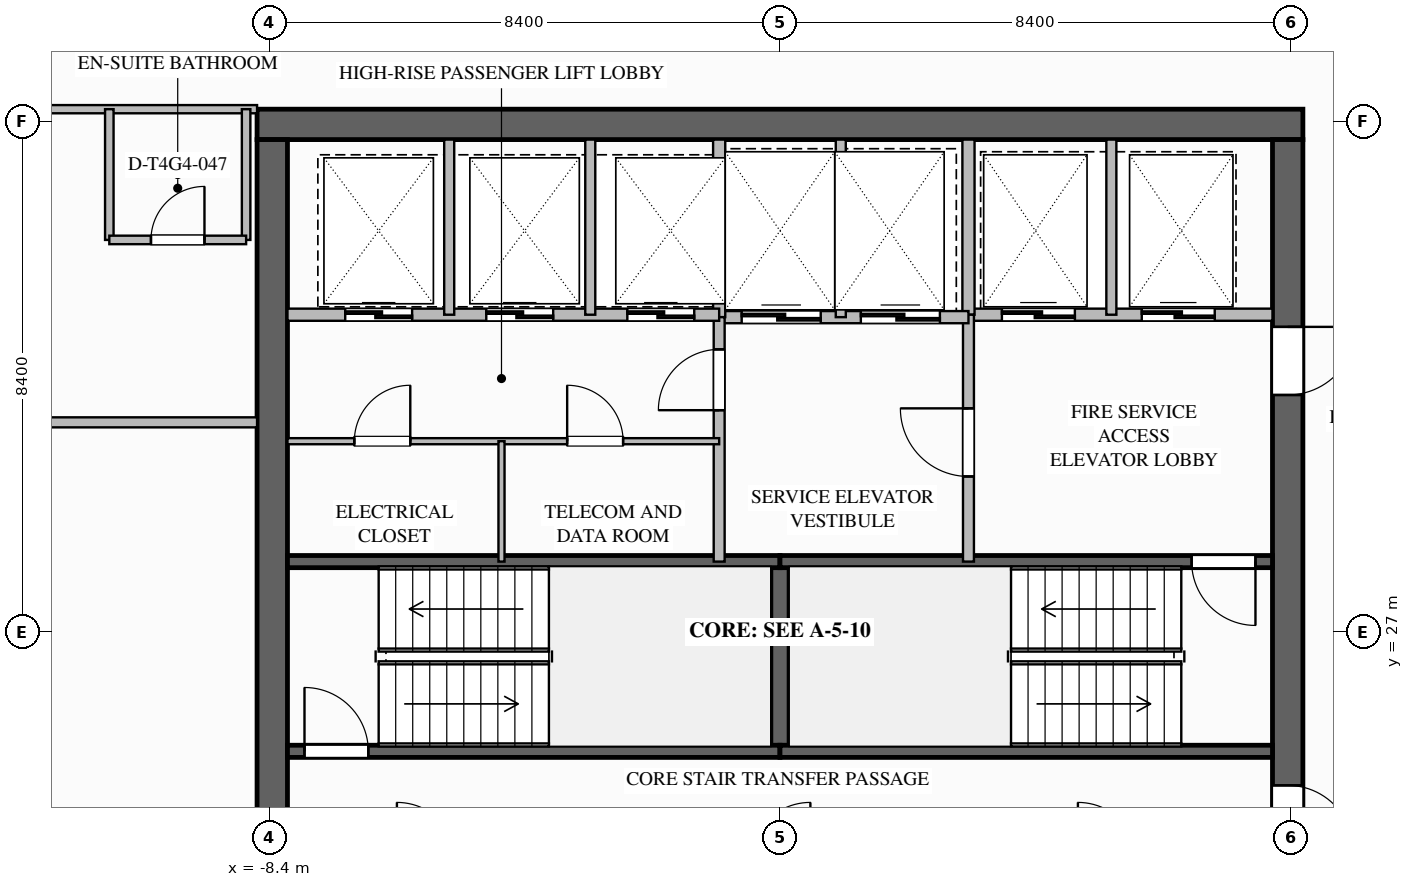
"""IFC4 building model, lengths in metres.
Left out: names, types, materials, properties, quantities, classifications, styles, units other than length and angle.
Written with IfcOpenShell. Run it as: python <this file> out.ifc"""

import sys

from ifc_helpers import new_model, si_unit, direction, frame, frame_2d, origin, place, context, subcontext, project, spatial, rectangle, extrude, element, fill, save


model = new_model("IFC4")
c1 = context("Model", 3, precision=1e-05, world=origin(), true_north=direction((0.0, 1.0)))
c2 = subcontext(c1, "Body", "Model", "MODEL_VIEW")
j1 = project(units=[si_unit("LENGTHUNIT", "METRE"), si_unit("PLANEANGLEUNIT", "RADIAN")], contexts=[c1])
p1 = place(None, origin())
s1 = spatial("IfcSite", under=j1, at=p1, CompositionType="ELEMENT")
p2 = place(p1, origin())
s2 = spatial("IfcBuilding", under=s1, at=p2, CompositionType="ELEMENT")
p3 = place(p2, frame((0.0, 0.0, 237.5)))
s3 = spatial("IfcBuildingStorey", under=s2, at=p3, CompositionType="ELEMENT", Elevation=237.5)
p4 = place(p3, frame((-8.6, 35.35, 0.0), z_axis=(0.0, 0.0, 1.0), x_axis=(1.0, 0.0, 0.0)))
e1 = element("IfcWall", 1, at=p4, inside=s3, PredefinedType="SHEAR", context=c2, shape_type="SweptSolid", body=[
    extrude(rectangle(XDim=17.2, YDim=0.5, at=frame_2d((8.6, 0.0))), origin(), (0.0, 0.0, 1.0), 3.6),
])
p5 = place(p3, frame((8.35, 35.1, 0.0), z_axis=(0.0, 0.0, 1.0), x_axis=(0.0, -1.0, 0.0)))
e2 = element("IfcWall", 2, at=p5, inside=s3, PredefinedType="SHEAR", context=c2, shape_type="SweptSolid", body=[
    extrude(rectangle(XDim=16.2, YDim=0.5, at=frame_2d((8.1, 0.0))), origin(), (0.0, 0.0, 1.0), 3.6),
])
p6 = place(p5, frame((3.08, 0.0, 0.0)))
e3 = element("IfcOpeningElement", 3, at=p6, cuts=e2, PredefinedType="OPENING", context=c2, shape_type="SweptSolid", body=[
    extrude(rectangle(XDim=1.12, YDim=2.1, at=frame_2d((0.56, 1.05))), frame((0.0, 0.26, 0.0), z_axis=(0.0, -1.0, 0.0), x_axis=(1.0, 0.0, 0.0)), (0.0, 0.0, 1.0), 0.52),
])
p7 = place(p5, frame((10.62, 0.0, 0.0)))
e4 = element("IfcOpeningElement", 4, at=p7, cuts=e2, PredefinedType="OPENING", context=c2, shape_type="SweptSolid", body=[
    extrude(rectangle(XDim=1.08, YDim=2.04, at=frame_2d((0.54, 1.02))), frame((0.0, 0.26, 0.0), z_axis=(0.0, -1.0, 0.0), x_axis=(1.0, 0.0, 0.0)), (0.0, 0.0, 1.0), 0.52),
])
p8 = place(p3, frame((-8.35, 18.9, 0.0), z_axis=(0.0, 0.0, 1.0), x_axis=(0.0, 1.0, 0.0)))
e5 = element("IfcWall", 5, at=p8, inside=s3, PredefinedType="SHEAR", context=c2, shape_type="SweptSolid", body=[
    extrude(rectangle(XDim=16.2, YDim=0.5, at=frame_2d((8.1, 0.0))), origin(), (0.0, 0.0, 1.0), 3.6),
])
p9 = place(p3, frame((0.0, 25.04, 0.0), z_axis=(0.0, 0.0, 1.0), x_axis=(0.0, 1.0, 0.0)))
e6 = element("IfcWall", 6, at=p9, inside=s3, PredefinedType="SOLIDWALL", context=c2, shape_type="SweptSolid", body=[
    extrude(rectangle(XDim=3.12, YDim=0.3, at=frame_2d((1.56, 0.0))), origin(), (0.0, 0.0, 1.0), 3.34),
])
p10 = place(p3, frame((-8.1, 25.04, 0.0), z_axis=(0.0, 0.0, 1.0), x_axis=(1.0, 0.0, 0.0)))
e7 = element("IfcWall", 7, at=p10, inside=s3, PredefinedType="SOLIDWALL", context=c2, shape_type="SweptSolid", body=[
    extrude(rectangle(XDim=8.1, YDim=0.2, at=frame_2d((4.05, 0.0))), origin(), (0.0, 0.0, 1.0), 3.34),
])
p11 = place(p10, frame((0.28, 0.0, 0.0)))
e8 = element("IfcOpeningElement", 8, at=p11, cuts=e7, PredefinedType="OPENING", context=c2, shape_type="SweptSolid", body=[
    extrude(rectangle(XDim=1.05, YDim=2.1, at=frame_2d((0.525, 1.05))), frame((0.0, 0.11, 0.0), z_axis=(0.0, -1.0, 0.0), x_axis=(1.0, 0.0, 0.0)), (0.0, 0.0, 1.0), 0.22),
])
for number, where, z_axis, x_axis in (
    (9, (-8.1, 28.16, 0.0), (0.0, 0.0, 1.0), (1.0, 0.0, 0.0)),
    (10, (0.0, 25.04, 0.0), (0.0, 0.0, 1.0), (1.0, 0.0, 0.0)),
):
    element("IfcWall", number, at=place(p3, frame(where, z_axis=z_axis, x_axis=x_axis)), inside=s3, PredefinedType="SOLIDWALL", context=c2, shape_type="SweptSolid", body=[
        extrude(rectangle(XDim=8.1, YDim=0.2, at=frame_2d((4.05, 0.0))), origin(), (0.0, 0.0, 1.0), 3.34),
    ])
p12 = place(p3, frame((8.1, 28.16, 0.0), z_axis=(0.0, 0.0, 1.0), x_axis=(-1.0, 0.0, 0.0)))
e11 = element("IfcWall", 11, at=p12, inside=s3, PredefinedType="SOLIDWALL", context=c2, shape_type="SweptSolid", body=[
    extrude(rectangle(XDim=8.1, YDim=0.2, at=frame_2d((4.05, 0.0))), origin(), (0.0, 0.0, 1.0), 3.34),
])
p13 = place(p12, frame((0.28, 0.0, 0.0)))
e12 = element("IfcOpeningElement", 12, at=p13, cuts=e11, PredefinedType="OPENING", context=c2, shape_type="SweptSolid", body=[
    extrude(rectangle(XDim=1.05, YDim=2.1, at=frame_2d((0.525, 1.05))), frame((0.0, 0.11, 0.0), z_axis=(0.0, -1.0, 0.0), x_axis=(1.0, 0.0, 0.0)), (0.0, 0.0, 1.0), 0.22),
])
p14 = place(p3, frame((3.1, 32.22, 0.0), z_axis=(0.0, 0.0, 1.0), x_axis=(1.0, 0.0, 0.0)))
e13 = element("IfcWall", 13, at=p14, inside=s3, PredefinedType="SOLIDWALL", context=c2, shape_type="SweptSolid", body=[
    extrude(rectangle(XDim=5.0, YDim=0.2, at=frame_2d((2.5, 0.0))), origin(), (0.0, 0.0, 1.0), 3.34),
])
p15 = place(p14, frame((0.55, 0.0, 0.0)))
e14 = element("IfcOpeningElement", 14, at=p15, cuts=e13, PredefinedType="OPENING", context=c2, shape_type="SweptSolid", body=[
    extrude(rectangle(XDim=1.2, YDim=2.2, at=frame_2d((0.6, 1.1))), frame((0.0, 0.11, 0.0), z_axis=(0.0, -1.0, 0.0), x_axis=(1.0, 0.0, 0.0)), (0.0, 0.0, 1.0), 0.22),
])
p16 = place(p14, frame((2.85, 0.0, 0.0)))
e15 = element("IfcOpeningElement", 15, at=p16, cuts=e13, PredefinedType="OPENING", context=c2, shape_type="SweptSolid", body=[
    extrude(rectangle(XDim=1.2, YDim=2.2, at=frame_2d((0.6, 1.1))), frame((0.0, 0.11, 0.0), z_axis=(0.0, -1.0, 0.0), x_axis=(1.0, 0.0, 0.0)), (0.0, 0.0, 1.0), 0.22),
])
p17 = place(p3, frame((3.1, 32.22, 0.0), z_axis=(0.0, 0.0, 1.0), x_axis=(0.0, 1.0, 0.0)))
e16 = element("IfcWall", 16, at=p17, inside=s3, PredefinedType="SOLIDWALL", context=c2, shape_type="SweptSolid", body=[
    extrude(rectangle(XDim=2.88, YDim=0.2, at=frame_2d((1.44, 0.0))), origin(), (0.0, 0.0, 1.0), 3.34),
])
p18 = place(p3, frame((5.45, 32.22, 0.0), z_axis=(0.0, 0.0, 1.0), x_axis=(0.0, 1.0, 0.0)))
e17 = element("IfcWall", 17, at=p18, inside=s3, PredefinedType="PARTITIONING", context=c2, shape_type="SweptSolid", body=[
    extrude(rectangle(XDim=2.88, YDim=0.165, at=frame_2d((1.44, 0.0))), origin(), (0.0, 0.0, 1.0), 3.34),
])
p19 = place(p3, frame((3.1, 28.16, 0.0), z_axis=(0.0, 0.0, 1.0), x_axis=(0.0, 1.0, 0.0)))
e18 = element("IfcWall", 18, at=p19, inside=s3, PredefinedType="SOLIDWALL", context=c2, shape_type="SweptSolid", body=[
    extrude(rectangle(XDim=4.06, YDim=0.18, at=frame_2d((2.03, 0.0))), origin(), (0.0, 0.0, 1.0), 3.34),
])
p20 = place(p19, frame((1.4, 0.0, 0.0)))
e19 = element("IfcOpeningElement", 19, at=p20, cuts=e18, PredefinedType="OPENING", context=c2, shape_type="SweptSolid", body=[
    extrude(rectangle(XDim=1.12, YDim=2.1, at=frame_2d((0.56, 1.05))), frame((0.0, 0.1, 0.0), z_axis=(0.0, -1.0, 0.0), x_axis=(1.0, 0.0, 0.0)), (0.0, 0.0, 1.0), 0.2),
])
p21 = place(p3, frame((-1.0, 32.18, 0.0), z_axis=(0.0, 0.0, 1.0), x_axis=(1.0, 0.0, 0.0)))
e20 = element("IfcWall", 20, at=p21, inside=s3, PredefinedType="SOLIDWALL", context=c2, shape_type="SweptSolid", body=[
    extrude(rectangle(XDim=4.1, YDim=0.2, at=frame_2d((2.05, 0.0))), origin(), (0.0, 0.0, 1.0), 3.34),
])
p22 = place(p21, frame((0.37, 0.0, 0.0)))
e21 = element("IfcOpeningElement", 21, at=p22, cuts=e20, PredefinedType="OPENING", context=c2, shape_type="SweptSolid", body=[
    extrude(rectangle(XDim=1.3, YDim=2.2, at=frame_2d((0.65, 1.1))), frame((0.0, 0.11, 0.0), z_axis=(0.0, -1.0, 0.0), x_axis=(1.0, 0.0, 0.0)), (0.0, 0.0, 1.0), 0.22),
])
p23 = place(p21, frame((2.33, 0.0, 0.0)))
e22 = element("IfcOpeningElement", 22, at=p23, cuts=e20, PredefinedType="OPENING", context=c2, shape_type="SweptSolid", body=[
    extrude(rectangle(XDim=1.3, YDim=2.2, at=frame_2d((0.65, 1.1))), frame((0.0, 0.11, 0.0), z_axis=(0.0, -1.0, 0.0), x_axis=(1.0, 0.0, 0.0)), (0.0, 0.0, 1.0), 0.22),
])
p24 = place(p3, frame((-1.0, 32.18, 0.0), z_axis=(0.0, 0.0, 1.0), x_axis=(0.0, 1.0, 0.0)))
e23 = element("IfcWall", 23, at=p24, inside=s3, PredefinedType="SOLIDWALL", context=c2, shape_type="SweptSolid", body=[
    extrude(rectangle(XDim=2.92, YDim=0.2, at=frame_2d((1.46, 0.0))), origin(), (0.0, 0.0, 1.0), 3.34),
])
p25 = place(p3, frame((1.0, 32.18, 0.0), z_axis=(0.0, 0.0, 1.0), x_axis=(0.0, 1.0, 0.0)))
e24 = element("IfcWall", 24, at=p25, inside=s3, PredefinedType="PARTITIONING", context=c2, shape_type="SweptSolid", body=[
    extrude(rectangle(XDim=2.92, YDim=0.165, at=frame_2d((1.46, 0.0))), origin(), (0.0, 0.0, 1.0), 3.34),
])
p26 = place(p3, frame((-1.0, 28.16, 0.0), z_axis=(0.0, 0.0, 1.0), x_axis=(0.0, 1.0, 0.0)))
e25 = element("IfcWall", 25, at=p26, inside=s3, PredefinedType="SOLIDWALL", context=c2, shape_type="SweptSolid", body=[
    extrude(rectangle(XDim=4.02, YDim=0.18, at=frame_2d((2.01, 0.0))), origin(), (0.0, 0.0, 1.0), 3.34),
])
p27 = place(p26, frame((2.49, 0.0, 0.0)))
e26 = element("IfcOpeningElement", 26, at=p27, cuts=e25, PredefinedType="OPENING", context=c2, shape_type="SweptSolid", body=[
    extrude(rectangle(XDim=1.0, YDim=2.1, at=frame_2d((0.5, 1.05))), frame((0.0, 0.1, 0.0), z_axis=(0.0, -1.0, 0.0), x_axis=(1.0, 0.0, 0.0)), (0.0, 0.0, 1.0), 0.2),
])
p28 = place(p3, frame((-8.1, 32.22, 0.0), z_axis=(0.0, 0.0, 1.0), x_axis=(1.0, 0.0, 0.0)))
e27 = element("IfcWall", 27, at=p28, inside=s3, PredefinedType="SOLIDWALL", context=c2, shape_type="SweptSolid", body=[
    extrude(rectangle(XDim=7.1, YDim=0.2, at=frame_2d((3.55, 0.0))), origin(), (0.0, 0.0, 1.0), 3.34),
])
p29 = place(p28, frame((0.95, 0.0, 0.0)))
e28 = element("IfcOpeningElement", 28, at=p29, cuts=e27, PredefinedType="OPENING", context=c2, shape_type="SweptSolid", body=[
    extrude(rectangle(XDim=1.1, YDim=2.2, at=frame_2d((0.55, 1.1))), frame((0.0, 0.11, 0.0), z_axis=(0.0, -1.0, 0.0), x_axis=(1.0, 0.0, 0.0)), (0.0, 0.0, 1.0), 0.22),
])
p30 = place(p28, frame((3.27, 0.0, 0.0)))
e29 = element("IfcOpeningElement", 29, at=p30, cuts=e27, PredefinedType="OPENING", context=c2, shape_type="SweptSolid", body=[
    extrude(rectangle(XDim=1.1, YDim=2.2, at=frame_2d((0.55, 1.1))), frame((0.0, 0.11, 0.0), z_axis=(0.0, -1.0, 0.0), x_axis=(1.0, 0.0, 0.0)), (0.0, 0.0, 1.0), 0.22),
])
p31 = place(p28, frame((5.59, 0.0, 0.0)))
e30 = element("IfcOpeningElement", 30, at=p31, cuts=e27, PredefinedType="OPENING", context=c2, shape_type="SweptSolid", body=[
    extrude(rectangle(XDim=1.1, YDim=2.2, at=frame_2d((0.55, 1.1))), frame((0.0, 0.11, 0.0), z_axis=(0.0, -1.0, 0.0), x_axis=(1.0, 0.0, 0.0)), (0.0, 0.0, 1.0), 0.22),
])
for number, where, z_axis, x_axis in (
    (31, (-5.44, 32.22, 0.0), (0.0, 0.0, 1.0), (0.0, 1.0, 0.0)),
    (32, (-3.12, 32.22, 0.0), (0.0, 0.0, 1.0), (0.0, 1.0, 0.0)),
):
    element("IfcWall", number, at=place(p3, frame(where, z_axis=z_axis, x_axis=x_axis)), inside=s3, PredefinedType="PARTITIONING", context=c2, shape_type="SweptSolid", body=[
        extrude(rectangle(XDim=2.88, YDim=0.165, at=frame_2d((1.44, 0.0))), origin(), (0.0, 0.0, 1.0), 3.34),
    ])
p32 = place(p3, frame((-8.1, 30.14, 0.0), z_axis=(0.0, 0.0, 1.0), x_axis=(1.0, 0.0, 0.0)))
e33 = element("IfcWall", 33, at=p32, inside=s3, PredefinedType="PARTITIONING", context=c2, shape_type="SweptSolid", body=[
    extrude(rectangle(XDim=7.1, YDim=0.1, at=frame_2d((3.55, 0.0))), origin(), (0.0, 0.0, 1.0), 3.34),
])
p33 = place(p32, frame((1.1, 0.0, 0.0)))
e34 = element("IfcOpeningElement", 34, at=p33, cuts=e33, PredefinedType="OPENING", context=c2, shape_type="SweptSolid", body=[
    extrude(rectangle(XDim=0.92, YDim=2.1, at=frame_2d((0.46, 1.05))), frame((0.0, 0.06, 0.0), z_axis=(0.0, -1.0, 0.0), x_axis=(1.0, 0.0, 0.0)), (0.0, 0.0, 1.0), 0.12),
])
p34 = place(p32, frame((4.6, 0.0, 0.0)))
e35 = element("IfcOpeningElement", 35, at=p34, cuts=e33, PredefinedType="OPENING", context=c2, shape_type="SweptSolid", body=[
    extrude(rectangle(XDim=0.92, YDim=2.1, at=frame_2d((0.46, 1.05))), frame((0.0, 0.06, 0.0), z_axis=(0.0, -1.0, 0.0), x_axis=(1.0, 0.0, 0.0)), (0.0, 0.0, 1.0), 0.12),
])
p35 = place(p3, frame((-4.58, 28.16, 0.0), z_axis=(0.0, 0.0, 1.0), x_axis=(0.0, 1.0, 0.0)))
e36 = element("IfcWall", 36, at=p35, inside=s3, PredefinedType="PARTITIONING", context=c2, shape_type="SweptSolid", body=[
    extrude(rectangle(XDim=1.98, YDim=0.1, at=frame_2d((0.99, 0.0))), origin(), (0.0, 0.0, 1.0), 3.34),
])
p36 = place(p3, frame((-16.2, 35.6, 0.0), z_axis=(0.0, 0.0, 1.0), x_axis=(1.0, 0.0, 0.0)))
e37 = element("IfcWall", 37, at=p36, inside=s3, PredefinedType="PARTITIONING", context=c2, shape_type="SweptSolid", body=[
    extrude(rectangle(XDim=7.6, YDim=0.135, at=frame_2d((3.8, 0.0))), origin(), (0.0, 0.0, 1.0), 2.717),
])
p37 = place(p36, frame((2.155, 0.0, 0.0)))
e38 = element("IfcOpeningElement", 38, at=p37, cuts=e37, PredefinedType="OPENING", context=c2, shape_type="SweptSolid", body=[
    extrude(rectangle(XDim=1.26, YDim=2.2, at=frame_2d((0.63, 1.1))), frame((0.0, 0.077, 0.0), z_axis=(0.0, -1.0, 0.0), x_axis=(1.0, 0.0, 0.0)), (0.0, 0.0, 1.0), 0.155),
])
p38 = place(p3, frame((-22.08, 30.45, 0.0), z_axis=(0.0, 0.0, 1.0), x_axis=(1.0, 0.0, 0.0)))
e39 = element("IfcWall", 39, at=p38, inside=s3, PredefinedType="PARTITIONING", context=c2, shape_type="SweptSolid", body=[
    extrude(rectangle(XDim=13.48, YDim=0.165, at=frame_2d((6.74, 0.0))), origin(), (0.0, 0.0, 1.0), 3.34),
])
for number, where, z_axis, x_axis in (
    (40, (-11.03, 35.6, 0.0), (0.0, 0.0, 1.0), (0.0, -1.0, 0.0)),
    (41, (-8.78, 35.6, 0.0), (0.0, 0.0, 1.0), (0.0, -1.0, 0.0)),
):
    element("IfcWall", number, at=place(p3, frame(where, z_axis=z_axis, x_axis=x_axis)), inside=s3, PredefinedType="PLUMBINGWALL", context=c2, shape_type="SweptSolid", body=[
        extrude(rectangle(XDim=2.15, YDim=0.14, at=frame_2d((1.075, 0.0))), origin(), (0.0, 0.0, 1.0), 3.34),
    ])
p39 = place(p3, frame((-11.03, 33.45, 0.0), z_axis=(0.0, 0.0, 1.0), x_axis=(1.0, 0.0, 0.0)))
e42 = element("IfcWall", 42, at=p39, inside=s3, PredefinedType="PLUMBINGWALL", context=c2, shape_type="SweptSolid", body=[
    extrude(rectangle(XDim=2.25, YDim=0.14, at=frame_2d((1.125, 0.0))), origin(), (0.0, 0.0, 1.0), 3.34),
])
p40 = place(p39, frame((0.685, 0.0, 0.0)))
e43 = element("IfcOpeningElement", 43, at=p40, cuts=e42, PredefinedType="OPENING", context=c2, shape_type="SweptSolid", body=[
    extrude(rectangle(XDim=0.88, YDim=2.1, at=frame_2d((0.44, 1.05))), frame((0.0, 0.08, 0.0), z_axis=(0.0, -1.0, 0.0), x_axis=(1.0, 0.0, 0.0)), (0.0, 0.0, 1.0), 0.16),
])
p41 = place(p11, origin())
e44 = element("IfcDoor", 44, at=p41, inside=s3, OperationType="SINGLE_SWING_LEFT", PredefinedType="DOOR", context=c2, shape_type="SweptSolid", body=[
    extrude(rectangle(XDim=1.05, YDim=2.1, at=frame_2d((0.525, 1.05))), frame((0.0, 0.025, 0.0), z_axis=(0.0, -1.0, 0.0), x_axis=(1.0, 0.0, 0.0)), (0.0, 0.0, 1.0), 0.05),
])
fill(e8, e44)
p42 = place(p13, origin())
e45 = element("IfcDoor", 45, at=p42, inside=s3, OperationType="SINGLE_SWING_LEFT", PredefinedType="DOOR", context=c2, shape_type="SweptSolid", body=[
    extrude(rectangle(XDim=1.05, YDim=2.1, at=frame_2d((0.525, 1.05))), frame((0.0, 0.025, 0.0), z_axis=(0.0, -1.0, 0.0), x_axis=(1.0, 0.0, 0.0)), (0.0, 0.0, 1.0), 0.05),
])
fill(e12, e45)
p43 = place(p15, origin())
e46 = element("IfcDoor", 46, at=p43, inside=s3, OperationType="SLIDING_TO_LEFT", PredefinedType="DOOR", context=c2, shape_type="SweptSolid", body=[
    extrude(rectangle(XDim=1.2, YDim=2.2, at=frame_2d((0.6, 1.1))), frame((0.0, 0.025, 0.0), z_axis=(0.0, -1.0, 0.0), x_axis=(1.0, 0.0, 0.0)), (0.0, 0.0, 1.0), 0.05),
])
fill(e14, e46)
p44 = place(p16, origin())
e47 = element("IfcDoor", 47, at=p44, inside=s3, OperationType="SLIDING_TO_LEFT", PredefinedType="DOOR", context=c2, shape_type="SweptSolid", body=[
    extrude(rectangle(XDim=1.2, YDim=2.2, at=frame_2d((0.6, 1.1))), frame((0.0, 0.025, 0.0), z_axis=(0.0, -1.0, 0.0), x_axis=(1.0, 0.0, 0.0)), (0.0, 0.0, 1.0), 0.05),
])
fill(e15, e47)
p45 = place(p20, origin())
e48 = element("IfcDoor", 48, at=p45, inside=s3, OperationType="SINGLE_SWING_RIGHT", PredefinedType="DOOR", context=c2, shape_type="SweptSolid", body=[
    extrude(rectangle(XDim=1.12, YDim=2.1, at=frame_2d((0.56, 1.05))), frame((0.0, 0.025, 0.0), z_axis=(0.0, -1.0, 0.0), x_axis=(1.0, 0.0, 0.0)), (0.0, 0.0, 1.0), 0.05),
])
fill(e19, e48)
p46 = place(p6, origin())
e49 = element("IfcDoor", 49, at=p46, inside=s3, OperationType="SINGLE_SWING_LEFT", PredefinedType="DOOR", context=c2, shape_type="SweptSolid", body=[
    extrude(rectangle(XDim=1.12, YDim=2.1, at=frame_2d((0.56, 1.05))), frame((0.0, 0.025, 0.0), z_axis=(0.0, -1.0, 0.0), x_axis=(1.0, 0.0, 0.0)), (0.0, 0.0, 1.0), 0.05),
])
fill(e3, e49)
p47 = place(p22, origin())
e50 = element("IfcDoor", 50, at=p47, inside=s3, OperationType="SLIDING_TO_LEFT", PredefinedType="DOOR", context=c2, shape_type="SweptSolid", body=[
    extrude(rectangle(XDim=1.3, YDim=2.2, at=frame_2d((0.65, 1.1))), frame((0.0, 0.025, 0.0), z_axis=(0.0, -1.0, 0.0), x_axis=(1.0, 0.0, 0.0)), (0.0, 0.0, 1.0), 0.05),
])
fill(e21, e50)
p48 = place(p23, origin())
e51 = element("IfcDoor", 51, at=p48, inside=s3, OperationType="SLIDING_TO_LEFT", PredefinedType="DOOR", context=c2, shape_type="SweptSolid", body=[
    extrude(rectangle(XDim=1.3, YDim=2.2, at=frame_2d((0.65, 1.1))), frame((0.0, 0.025, 0.0), z_axis=(0.0, -1.0, 0.0), x_axis=(1.0, 0.0, 0.0)), (0.0, 0.0, 1.0), 0.05),
])
fill(e22, e51)
p49 = place(p27, origin())
e52 = element("IfcDoor", 52, at=p49, inside=s3, OperationType="SINGLE_SWING_LEFT", PredefinedType="DOOR", context=c2, shape_type="SweptSolid", body=[
    extrude(rectangle(XDim=1.0, YDim=2.1, at=frame_2d((0.5, 1.05))), frame((0.0, 0.025, 0.0), z_axis=(0.0, -1.0, 0.0), x_axis=(1.0, 0.0, 0.0)), (0.0, 0.0, 1.0), 0.05),
])
fill(e26, e52)
p50 = place(p29, origin())
e53 = element("IfcDoor", 53, at=p50, inside=s3, OperationType="SLIDING_TO_LEFT", PredefinedType="DOOR", context=c2, shape_type="SweptSolid", body=[
    extrude(rectangle(XDim=1.1, YDim=2.2, at=frame_2d((0.55, 1.1))), frame((0.0, 0.025, 0.0), z_axis=(0.0, -1.0, 0.0), x_axis=(1.0, 0.0, 0.0)), (0.0, 0.0, 1.0), 0.05),
])
fill(e28, e53)
p51 = place(p30, origin())
e54 = element("IfcDoor", 54, at=p51, inside=s3, OperationType="SLIDING_TO_LEFT", PredefinedType="DOOR", context=c2, shape_type="SweptSolid", body=[
    extrude(rectangle(XDim=1.1, YDim=2.2, at=frame_2d((0.55, 1.1))), frame((0.0, 0.025, 0.0), z_axis=(0.0, -1.0, 0.0), x_axis=(1.0, 0.0, 0.0)), (0.0, 0.0, 1.0), 0.05),
])
fill(e29, e54)
p52 = place(p31, origin())
e55 = element("IfcDoor", 55, at=p52, inside=s3, OperationType="SLIDING_TO_LEFT", PredefinedType="DOOR", context=c2, shape_type="SweptSolid", body=[
    extrude(rectangle(XDim=1.1, YDim=2.2, at=frame_2d((0.55, 1.1))), frame((0.0, 0.025, 0.0), z_axis=(0.0, -1.0, 0.0), x_axis=(1.0, 0.0, 0.0)), (0.0, 0.0, 1.0), 0.05),
])
fill(e30, e55)
p53 = place(p33, origin())
e56 = element("IfcDoor", 56, at=p53, inside=s3, OperationType="SINGLE_SWING_RIGHT", PredefinedType="DOOR", context=c2, shape_type="SweptSolid", body=[
    extrude(rectangle(XDim=0.92, YDim=2.1, at=frame_2d((0.46, 1.05))), frame((0.0, 0.025, 0.0), z_axis=(0.0, -1.0, 0.0), x_axis=(1.0, 0.0, 0.0)), (0.0, 0.0, 1.0), 0.05),
])
fill(e34, e56)
p54 = place(p34, origin())
e57 = element("IfcDoor", 57, at=p54, inside=s3, OperationType="SINGLE_SWING_LEFT", PredefinedType="DOOR", context=c2, shape_type="SweptSolid", body=[
    extrude(rectangle(XDim=0.92, YDim=2.1, at=frame_2d((0.46, 1.05))), frame((0.0, 0.025, 0.0), z_axis=(0.0, -1.0, 0.0), x_axis=(1.0, 0.0, 0.0)), (0.0, 0.0, 1.0), 0.05),
])
fill(e35, e57)
p55 = place(p7, origin())
e58 = element("IfcDoor", 58, at=p55, inside=s3, OperationType="SINGLE_SWING_RIGHT", PredefinedType="DOOR", context=c2, shape_type="SweptSolid", body=[
    extrude(rectangle(XDim=1.08, YDim=2.04, at=frame_2d((0.54, 1.02))), frame((0.0, 0.025, 0.0), z_axis=(0.0, -1.0, 0.0), x_axis=(1.0, 0.0, 0.0)), (0.0, 0.0, 1.0), 0.05),
])
fill(e4, e58)
p56 = place(p40, origin())
e59 = element("IfcDoor", 59, at=p56, inside=s3, OperationType="SINGLE_SWING_RIGHT", PredefinedType="DOOR", context=c2, shape_type="SweptSolid", body=[
    extrude(rectangle(XDim=0.88, YDim=2.1, at=frame_2d((0.44, 1.05))), frame((0.0, 0.025, 0.0), z_axis=(0.0, -1.0, 0.0), x_axis=(1.0, 0.0, 0.0)), (0.0, 0.0, 1.0), 0.05),
])
fill(e43, e59)
save(model, sys.argv[1])
